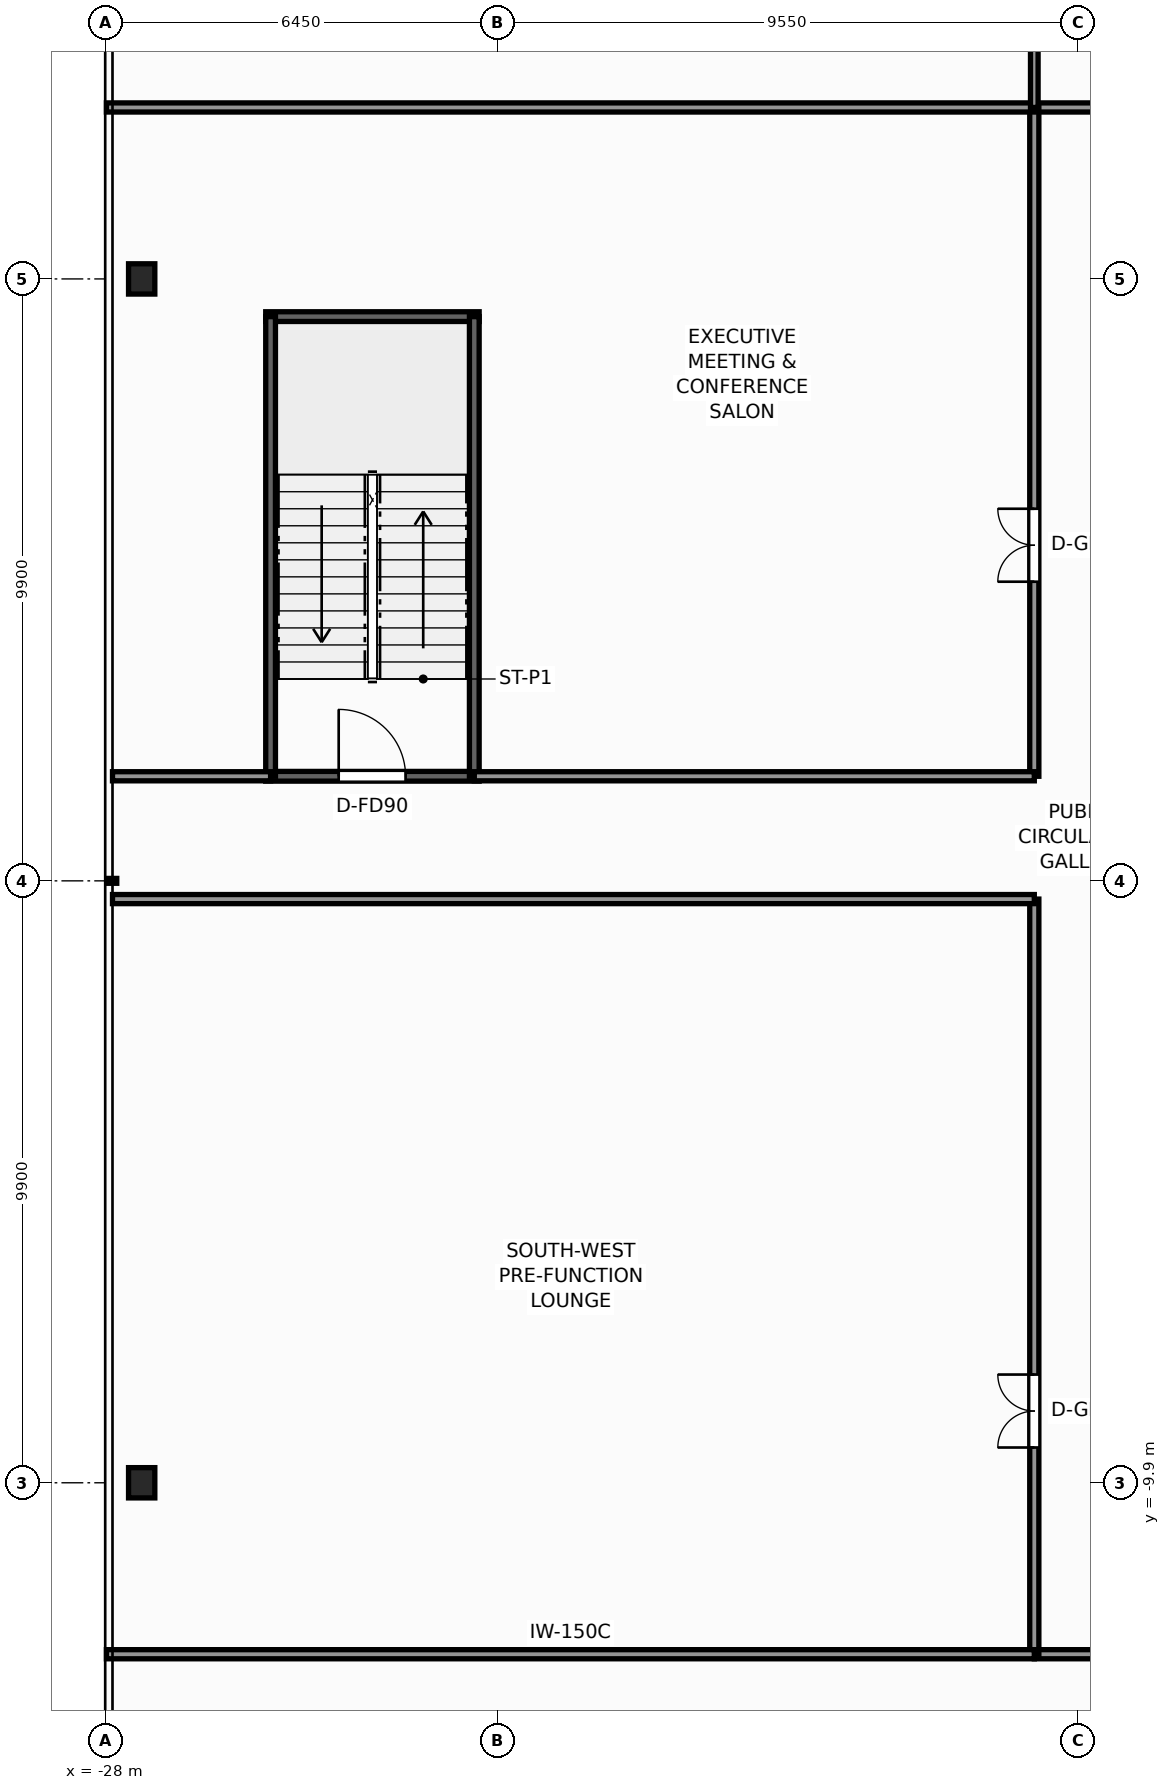
"""IFC4 building model, lengths in metres.
Left out: names, types, materials, properties, quantities, classifications, styles, units other than length and angle.
Written with IfcOpenShell. Run it as: python <this file> out.ifc"""

import sys

from ifc_helpers import new_model, si_unit, direction, frame, frame_2d, origin, origin_2d, place, context, subcontext, project, spatial, rectangle, i_section, extrude, element, fill, save


model = new_model("IFC4")
c1 = context("Model", 3, precision=1e-05, world=origin(), true_north=direction((0.0, 1.0)))
c2 = subcontext(c1, "Body", "Model", "MODEL_VIEW")
j1 = project(units=[si_unit("LENGTHUNIT", "METRE"), si_unit("PLANEANGLEUNIT", "RADIAN")], contexts=[c1])
p1 = place(None, origin())
s1 = spatial("IfcSite", under=j1, at=p1, CompositionType="ELEMENT")
p2 = place(p1, origin())
s2 = spatial("IfcBuilding", under=s1, at=p2, CompositionType="ELEMENT")
p3 = place(p2, frame((0.0, 0.0, 5.5)))
s3 = spatial("IfcBuildingStorey", under=s2, at=p3, CompositionType="ELEMENT", Elevation=5.5)
for number, where, z_axis, x_axis in (
    (1, (-27.4, -9.9, 0.0), (0.0, 0.0, 1.0), (1.0, 0.0, 0.0)),
    (2, (-27.4, 9.9, 0.0), (0.0, 0.0, 1.0), (1.0, 0.0, 0.0)),
):
    element("IfcColumn", number, at=place(p3, frame(where, z_axis=z_axis, x_axis=x_axis)), inside=s3, PredefinedType="COLUMN", context=c2, shape_type="SweptSolid", body=[
        extrude(i_section(OverallWidth=0.432, OverallDepth=0.498, WebThickness=0.056, FlangeThickness=0.089, FilletRadius=0.025, at=origin_2d()), origin(), (0.0, 0.0, 1.0), 4.5),
    ])
p4 = place(p3, frame((-25.36, 1.72, 0.0), z_axis=(0.0, 0.0, 1.0), x_axis=(1.0, 0.0, 0.0)))
e3 = element("IfcWall", 3, at=p4, inside=s3, PredefinedType="SHEAR", context=c2, shape_type="SweptSolid", body=[
    extrude(rectangle(XDim=3.51, YDim=0.16, at=frame_2d((1.755, 0.0))), origin(), (0.0, 0.0, 1.0), 4.5),
])
p5 = place(p4, frame((1.2, 0.0, 0.0)))
e4 = element("IfcOpeningElement", 4, at=p5, cuts=e3, PredefinedType="OPENING", context=c2, shape_type="SweptSolid", body=[
    extrude(rectangle(XDim=1.1, YDim=2.2, at=frame_2d((0.55, 1.1))), frame((0.0, 0.09, 0.0), z_axis=(0.0, -1.0, 0.0), x_axis=(1.0, 0.0, 0.0)), (0.0, 0.0, 1.0), 0.18),
])
p6 = place(p3, frame((-25.36, 9.28, 0.0), z_axis=(0.0, 0.0, 1.0), x_axis=(1.0, 0.0, 0.0)))
e5 = element("IfcWall", 5, at=p6, inside=s3, PredefinedType="SHEAR", context=c2, shape_type="SweptSolid", body=[
    extrude(rectangle(XDim=3.51, YDim=0.16, at=frame_2d((1.755, 0.0))), origin(), (0.0, 0.0, 1.0), 4.5),
])
for number, where, z_axis, x_axis in (
    (6, (-25.28, 1.72, 0.0), (0.0, 0.0, 1.0), (0.0, 1.0, 0.0)),
    (7, (-21.93, 1.72, 0.0), (0.0, 0.0, 1.0), (0.0, 1.0, 0.0)),
):
    element("IfcWall", number, at=place(p3, frame(where, z_axis=z_axis, x_axis=x_axis)), inside=s3, PredefinedType="SHEAR", context=c2, shape_type="SweptSolid", body=[
        extrude(rectangle(XDim=7.56, YDim=0.16, at=frame_2d((3.78, 0.0))), origin(), (0.0, 0.0, 1.0), 4.5),
    ])
p7 = place(p3, frame((-12.72, -12.72, 0.0), z_axis=(0.0, 0.0, 1.0), x_axis=(1.0, 0.0, 0.0)))
e8 = element("IfcWall", 8, at=p7, inside=s3, PredefinedType="PARTITIONING", context=c2, shape_type="SweptSolid", body=[
    extrude(rectangle(XDim=25.44, YDim=0.15, at=frame_2d((12.72, 0.0))), origin(), (0.0, 0.0, 1.0), 3.194),
])
p8 = place(p7, frame((3.6, 0.0, 0.0)))
e9 = element("IfcOpeningElement", 9, at=p8, cuts=e8, PredefinedType="OPENING", context=c2, shape_type="SweptSolid", body=[
    extrude(rectangle(XDim=1.6, YDim=2.3, at=frame_2d((0.8, 1.15))), frame((0.0, 0.085, 0.0), z_axis=(0.0, -1.0, 0.0), x_axis=(1.0, 0.0, 0.0)), (0.0, 0.0, 1.0), 0.17),
])
p9 = place(p7, frame((11.57, 0.0, 0.0)))
e10 = element("IfcOpeningElement", 10, at=p9, cuts=e8, PredefinedType="OPENING", context=c2, shape_type="SweptSolid", body=[
    extrude(rectangle(XDim=1.2, YDim=2.2, at=frame_2d((0.6, 1.1))), frame((0.0, 0.085, 0.0), z_axis=(0.0, -1.0, 0.0), x_axis=(1.0, 0.0, 0.0)), (0.0, 0.0, 1.0), 0.17),
])
p10 = place(p3, frame((-12.72, 12.72, 0.0), z_axis=(0.0, 0.0, 1.0), x_axis=(1.0, 0.0, 0.0)))
e11 = element("IfcWall", 11, at=p10, inside=s3, PredefinedType="PARTITIONING", context=c2, shape_type="SweptSolid", body=[
    extrude(rectangle(XDim=25.44, YDim=0.15, at=frame_2d((12.72, 0.0))), origin(), (0.0, 0.0, 1.0), 3.194),
])
p11 = place(p10, frame((1.8, 0.0, 0.0)))
e12 = element("IfcOpeningElement", 12, at=p11, cuts=e11, PredefinedType="OPENING", context=c2, shape_type="SweptSolid", body=[
    extrude(rectangle(XDim=0.95, YDim=2.06, at=frame_2d((0.475, 1.03))), frame((0.0, 0.085, 0.0), z_axis=(0.0, -1.0, 0.0), x_axis=(1.0, 0.0, 0.0)), (0.0, 0.0, 1.0), 0.17),
])
p12 = place(p10, frame((10.5, 0.0, 0.0)))
e13 = element("IfcOpeningElement", 13, at=p12, cuts=e11, PredefinedType="OPENING", context=c2, shape_type="SweptSolid", body=[
    extrude(rectangle(XDim=1.6, YDim=2.3, at=frame_2d((0.8, 1.15))), frame((0.0, 0.085, 0.0), z_axis=(0.0, -1.0, 0.0), x_axis=(1.0, 0.0, 0.0)), (0.0, 0.0, 1.0), 0.17),
])
p13 = place(p3, frame((-12.72, -12.72, 0.0), z_axis=(0.0, 0.0, 1.0), x_axis=(0.0, 1.0, 0.0)))
e14 = element("IfcWall", 14, at=p13, inside=s3, PredefinedType="PARTITIONING", context=c2, shape_type="SweptSolid", body=[
    extrude(rectangle(XDim=12.42, YDim=0.15, at=frame_2d((6.21, 0.0))), origin(), (0.0, 0.0, 1.0), 3.194),
])
p14 = place(p13, frame((3.4, 0.0, 0.0)))
e15 = element("IfcOpeningElement", 15, at=p14, cuts=e14, PredefinedType="OPENING", context=c2, shape_type="SweptSolid", body=[
    extrude(rectangle(XDim=1.2, YDim=2.2, at=frame_2d((0.6, 1.1))), frame((0.0, 0.085, 0.0), z_axis=(0.0, -1.0, 0.0), x_axis=(1.0, 0.0, 0.0)), (0.0, 0.0, 1.0), 0.17),
])
p15 = place(p3, frame((-12.72, 1.72, 0.0), z_axis=(0.0, 0.0, 1.0), x_axis=(0.0, 1.0, 0.0)))
e16 = element("IfcWall", 16, at=p15, inside=s3, PredefinedType="PARTITIONING", context=c2, shape_type="SweptSolid", body=[
    extrude(rectangle(XDim=11.0, YDim=0.15, at=frame_2d((5.5, 0.0))), origin(), (0.0, 0.0, 1.0), 3.194),
])
p16 = place(p15, frame((3.2, 0.0, 0.0)))
e17 = element("IfcOpeningElement", 17, at=p16, cuts=e16, PredefinedType="OPENING", context=c2, shape_type="SweptSolid", body=[
    extrude(rectangle(XDim=1.2, YDim=2.2, at=frame_2d((0.6, 1.1))), frame((0.0, 0.085, 0.0), z_axis=(0.0, -1.0, 0.0), x_axis=(1.0, 0.0, 0.0)), (0.0, 0.0, 1.0), 0.17),
])
p17 = place(p3, frame((-27.88, -0.3, 0.0), z_axis=(0.0, 0.0, 1.0), x_axis=(1.0, 0.0, 0.0)))
e18 = element("IfcWall", 18, at=p17, inside=s3, PredefinedType="PARTITIONING", context=c2, shape_type="SweptSolid", body=[
    extrude(rectangle(XDim=15.16, YDim=0.15, at=frame_2d((7.58, 0.0))), origin(), (0.0, 0.0, 1.0), 3.589),
])
p18 = place(p3, frame((-27.88, 1.72, 0.0), z_axis=(0.0, 0.0, 1.0), x_axis=(1.0, 0.0, 0.0)))
e19 = element("IfcWall", 19, at=p18, inside=s3, PredefinedType="PARTITIONING", context=c2, shape_type="SweptSolid", body=[
    extrude(rectangle(XDim=2.6, YDim=0.15, at=frame_2d((1.3, 0.0))), origin(), (0.0, 0.0, 1.0), 3.589),
])
p19 = place(p3, frame((-21.93, 1.72, 0.0), z_axis=(0.0, 0.0, 1.0), x_axis=(1.0, 0.0, 0.0)))
e20 = element("IfcWall", 20, at=p19, inside=s3, PredefinedType="PARTITIONING", context=c2, shape_type="SweptSolid", body=[
    extrude(rectangle(XDim=9.21, YDim=0.15, at=frame_2d((4.605, 0.0))), origin(), (0.0, 0.0, 1.0), 4.22),
])
for number, where, z_axis, x_axis in (
    (21, (-27.98, -12.72, 0.0), (0.0, 0.0, 1.0), (1.0, 0.0, 0.0)),
    (22, (-27.98, 12.72, 0.0), (0.0, 0.0, 1.0), (1.0, 0.0, 0.0)),
):
    element("IfcWall", number, at=place(p3, frame(where, z_axis=z_axis, x_axis=x_axis)), inside=s3, PredefinedType="PARTITIONING", context=c2, shape_type="SweptSolid", body=[
        extrude(rectangle(XDim=15.26, YDim=0.15, at=frame_2d((7.63, 0.0))), origin(), (0.0, 0.0, 1.0), 3.589),
    ])
p20 = place(p3, frame((-12.72, 12.72, 0.0), z_axis=(0.0, 0.0, 1.0), x_axis=(0.0, 1.0, 0.0)))
e23 = element("IfcWall", 23, at=p20, inside=s3, PredefinedType="PARTITIONING", context=c2, shape_type="SweptSolid", body=[
    extrude(rectangle(XDim=4.6, YDim=0.125, at=frame_2d((2.3, 0.0))), origin(), (0.0, 0.0, 1.0), 4.22),
])
p21 = place(p5, origin())
e24 = element("IfcDoor", 24, at=p21, inside=s3, OperationType="SINGLE_SWING_LEFT", PredefinedType="DOOR", context=c2, shape_type="SweptSolid", body=[
    extrude(rectangle(XDim=1.1, YDim=2.2, at=frame_2d((0.55, 1.1))), frame((0.0, 0.025, 0.0), z_axis=(0.0, -1.0, 0.0), x_axis=(1.0, 0.0, 0.0)), (0.0, 0.0, 1.0), 0.05),
])
fill(e4, e24)
p22 = place(p16, origin())
e25 = element("IfcDoor", 25, at=p22, inside=s3, OperationType="DOUBLE_DOOR_SINGLE_SWING", PredefinedType="DOOR", context=c2, shape_type="SweptSolid", body=[
    extrude(rectangle(XDim=1.2, YDim=2.2, at=frame_2d((0.6, 1.1))), frame((0.0, 0.025, 0.0), z_axis=(0.0, -1.0, 0.0), x_axis=(1.0, 0.0, 0.0)), (0.0, 0.0, 1.0), 0.05),
])
fill(e17, e25)
p23 = place(p14, origin())
e26 = element("IfcDoor", 26, at=p23, inside=s3, OperationType="DOUBLE_DOOR_SINGLE_SWING", PredefinedType="DOOR", context=c2, shape_type="SweptSolid", body=[
    extrude(rectangle(XDim=1.2, YDim=2.2, at=frame_2d((0.6, 1.1))), frame((0.0, 0.025, 0.0), z_axis=(0.0, -1.0, 0.0), x_axis=(1.0, 0.0, 0.0)), (0.0, 0.0, 1.0), 0.05),
])
fill(e15, e26)
save(model, sys.argv[1])
